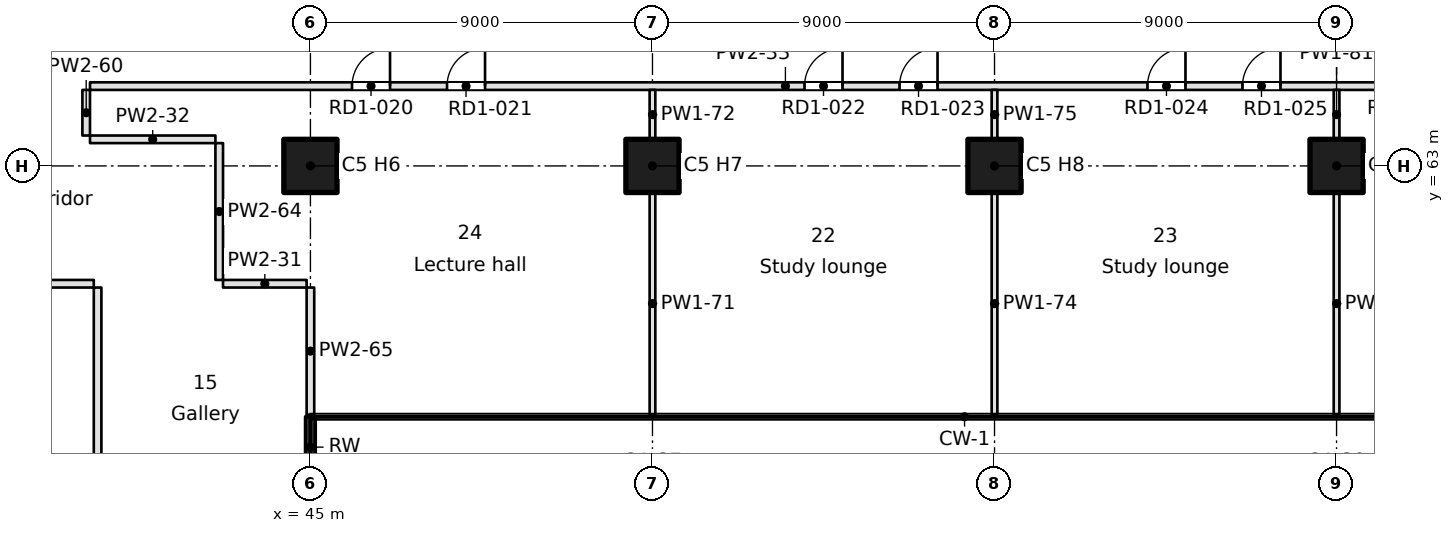
"""IFC4 building model, lengths in metres.
Left out: names, types, materials, properties, quantities, classifications, styles, units other than length and angle.
Written with IfcOpenShell. Run it as: python <this file> out.ifc"""

import sys

from ifc_helpers import new_model, si_unit, direction, frame, frame_2d, origin, origin_2d, place, context, subcontext, project, spatial, rectangle, extrude, element, fill, save


model = new_model("IFC4")
c1 = context("Model", 3, precision=1e-05, world=origin(), true_north=direction((0.0, 1.0)))
c2 = subcontext(c1, "Body", "Model", "MODEL_VIEW")
j1 = project(units=[si_unit("LENGTHUNIT", "METRE"), si_unit("PLANEANGLEUNIT", "RADIAN")], contexts=[c1])
p1 = place(None, origin())
s1 = spatial("IfcSite", under=j1, at=p1, CompositionType="ELEMENT")
p2 = place(p1, origin())
s2 = spatial("IfcBuilding", under=s1, at=p2, CompositionType="ELEMENT")
p3 = place(p2, frame((0.0, 0.0, 76.5)))
s3 = spatial("IfcBuildingStorey", under=s2, at=p3, CompositionType="ELEMENT", Elevation=76.5)
for number, where, z_axis, x_axis in (
    (1, (45.0, 63.0, 0.0), (0.0, 0.0, 1.0), (1.0, 0.0, 0.0)),
    (2, (54.0, 63.0, 0.0), (0.0, 0.0, 1.0), (1.0, 0.0, 0.0)),
    (3, (63.0, 63.0, 0.0), (0.0, 0.0, 1.0), (1.0, 0.0, 0.0)),
    (4, (72.0, 63.0, 0.0), (0.0, 0.0, 1.0), (1.0, 0.0, 0.0)),
):
    element("IfcColumn", number, at=place(p3, frame(where, z_axis=z_axis, x_axis=x_axis)), inside=s3, PredefinedType="COLUMN", context=c2, shape_type="SweptSolid", body=[
        extrude(rectangle(XDim=1.4, YDim=1.4, at=origin_2d()), origin(), (0.0, 0.0, 1.0), 3.7),
    ])
p4 = place(p3, frame((44.999, 54.8, 0.0), z_axis=(0.0, 0.0, 1.0), x_axis=(0.000152508767, 0.999999988371, 0.0)))
e5 = element("IfcWall", 5, at=p4, inside=s3, PredefinedType="SOLIDWALL", context=c2, shape_type="SweptSolid", body=[
    extrude(rectangle(XDim=1.601, YDim=0.25, at=frame_2d((0.8, 0.0))), origin(), (0.0, 0.0, 1.0), 3.25),
])
p5 = place(p3, frame((39.3, 59.9, 0.0), z_axis=(0.0, 0.0, 1.0), x_axis=(-1.0, 0.0, 0.0)))
e6 = element("IfcWall", 6, at=p5, inside=s3, PredefinedType="PARTITIONING", context=c2, shape_type="SweptSolid", body=[
    extrude(rectangle(XDim=11.8, YDim=0.2, at=frame_2d((5.9, 0.0))), origin(), (0.0, 0.0, 1.0), 3.25),
])
p6 = place(p3, frame((42.7, 59.9, 0.0), z_axis=(0.0, 0.0, 1.0), x_axis=(1.0, 0.0, 0.0)))
e7 = element("IfcWall", 7, at=p6, inside=s3, PredefinedType="PARTITIONING", context=c2, shape_type="SweptSolid", body=[
    extrude(rectangle(XDim=2.2, YDim=0.2, at=frame_2d((1.1, 0.0))), origin(), (0.0, 0.0, 1.0), 3.25),
])
p7 = place(p3, frame((39.2, 63.7, 0.0), z_axis=(0.0, 0.0, 1.0), x_axis=(1.0, 0.0, 0.0)))
e8 = element("IfcWall", 8, at=p7, inside=s3, PredefinedType="PARTITIONING", context=c2, shape_type="SweptSolid", body=[
    extrude(rectangle(XDim=3.3, YDim=0.2, at=frame_2d((1.65, 0.0))), origin(), (0.0, 0.0, 1.0), 3.25),
])
p8 = place(p3, frame((75.796, 65.1, 0.0), z_axis=(0.0, 0.0, 1.0), x_axis=(-1.0, 0.0, 0.0)))
e9 = element("IfcWall", 9, at=p8, inside=s3, PredefinedType="PARTITIONING", context=c2, shape_type="SweptSolid", body=[
    extrude(rectangle(XDim=36.596, YDim=0.2, at=frame_2d((18.298, 0.0))), origin(), (0.0, 0.0, 1.0), 3.25),
])
p9 = place(p8, frame((28.702, 0.0, 0.0)))
e10 = element("IfcOpeningElement", 10, at=p9, cuts=e9, PredefinedType="OPENING", context=c2, shape_type="SweptSolid", body=[
    extrude(rectangle(XDim=1.0, YDim=2.1, at=frame_2d((0.5, 1.05))), frame((0.0, 0.1, 0.0), z_axis=(0.0, -1.0, 0.0), x_axis=(1.0, 0.0, 0.0)), (0.0, 0.0, 1.0), 0.2),
])
p10 = place(p8, frame((26.202, 0.0, 0.0)))
e11 = element("IfcOpeningElement", 11, at=p10, cuts=e9, PredefinedType="OPENING", context=c2, shape_type="SweptSolid", body=[
    extrude(rectangle(XDim=1.0, YDim=2.1, at=frame_2d((0.5, 1.05))), frame((0.0, 0.1, 0.0), z_axis=(0.0, -1.0, 0.0), x_axis=(1.0, 0.0, 0.0)), (0.0, 0.0, 1.0), 0.2),
])
p11 = place(p8, frame((16.795, 0.0, 0.0)))
e12 = element("IfcOpeningElement", 12, at=p11, cuts=e9, PredefinedType="OPENING", context=c2, shape_type="SweptSolid", body=[
    extrude(rectangle(XDim=1.0, YDim=2.1, at=frame_2d((0.5, 1.05))), frame((0.0, 0.1, 0.0), z_axis=(0.0, -1.0, 0.0), x_axis=(1.0, 0.0, 0.0)), (0.0, 0.0, 1.0), 0.2),
])
p12 = place(p8, frame((14.295, 0.0, 0.0)))
e13 = element("IfcOpeningElement", 13, at=p12, cuts=e9, PredefinedType="OPENING", context=c2, shape_type="SweptSolid", body=[
    extrude(rectangle(XDim=1.0, YDim=2.1, at=frame_2d((0.5, 1.05))), frame((0.0, 0.1, 0.0), z_axis=(0.0, -1.0, 0.0), x_axis=(1.0, 0.0, 0.0)), (0.0, 0.0, 1.0), 0.2),
])
p13 = place(p8, frame((7.772, 0.0, 0.0)))
e14 = element("IfcOpeningElement", 14, at=p13, cuts=e9, PredefinedType="OPENING", context=c2, shape_type="SweptSolid", body=[
    extrude(rectangle(XDim=1.0, YDim=2.1, at=frame_2d((0.5, 1.05))), frame((0.0, 0.1, 0.0), z_axis=(0.0, -1.0, 0.0), x_axis=(1.0, 0.0, 0.0)), (0.0, 0.0, 1.0), 0.2),
])
p14 = place(p8, frame((5.272, 0.0, 0.0)))
e15 = element("IfcOpeningElement", 15, at=p14, cuts=e9, PredefinedType="OPENING", context=c2, shape_type="SweptSolid", body=[
    extrude(rectangle(XDim=1.0, YDim=2.1, at=frame_2d((0.5, 1.05))), frame((0.0, 0.1, 0.0), z_axis=(0.0, -1.0, 0.0), x_axis=(1.0, 0.0, 0.0)), (0.0, 0.0, 1.0), 0.2),
])
p15 = place(p8, frame((1.38, 0.0, 0.0)))
e16 = element("IfcOpeningElement", 16, at=p15, cuts=e9, PredefinedType="OPENING", context=c2, shape_type="SweptSolid", body=[
    extrude(rectangle(XDim=1.0, YDim=2.1, at=frame_2d((0.5, 1.05))), frame((0.0, 0.1, 0.0), z_axis=(0.0, -1.0, 0.0), x_axis=(1.0, 0.0, 0.0)), (0.0, 0.0, 1.0), 0.2),
])
p16 = place(p3, frame((39.1, 65.0, 0.0), z_axis=(0.0, 0.0, 1.0), x_axis=(0.0, -1.0, 0.0)))
e17 = element("IfcWall", 17, at=p16, inside=s3, PredefinedType="PARTITIONING", context=c2, shape_type="SweptSolid", body=[
    extrude(rectangle(XDim=1.2, YDim=0.2, at=frame_2d((0.6, 0.0))), origin(), (0.0, 0.0, 1.0), 3.25),
])
p17 = place(p3, frame((39.4, 16.991, 0.0), z_axis=(0.0, 0.0, 1.0), x_axis=(0.0, 1.0, 0.0)))
e18 = element("IfcWall", 18, at=p17, inside=s3, PredefinedType="PARTITIONING", context=c2, shape_type="SweptSolid", body=[
    extrude(rectangle(XDim=42.809, YDim=0.2, at=frame_2d((21.405, 0.0))), origin(), (0.0, 0.0, 1.0), 3.25),
])
p18 = place(p17, frame((4.608, 0.0, 0.0)))
e19 = element("IfcOpeningElement", 19, at=p18, cuts=e18, PredefinedType="OPENING", context=c2, shape_type="SweptSolid", body=[
    extrude(rectangle(XDim=1.8, YDim=2.1, at=frame_2d((0.9, 1.05))), frame((0.0, 0.1, 0.0), z_axis=(0.0, -1.0, 0.0), x_axis=(1.0, 0.0, 0.0)), (0.0, 0.0, 1.0), 0.2),
])
p19 = place(p17, frame((13.62, 0.0, 0.0)))
e20 = element("IfcOpeningElement", 20, at=p19, cuts=e18, PredefinedType="OPENING", context=c2, shape_type="SweptSolid", body=[
    extrude(rectangle(XDim=1.8, YDim=2.1, at=frame_2d((0.9, 1.05))), frame((0.0, 0.1, 0.0), z_axis=(0.0, -1.0, 0.0), x_axis=(1.0, 0.0, 0.0)), (0.0, 0.0, 1.0), 0.2),
])
p20 = place(p17, frame((22.633, 0.0, 0.0)))
e21 = element("IfcOpeningElement", 21, at=p20, cuts=e18, PredefinedType="OPENING", context=c2, shape_type="SweptSolid", body=[
    extrude(rectangle(XDim=1.8, YDim=2.1, at=frame_2d((0.9, 1.05))), frame((0.0, 0.1, 0.0), z_axis=(0.0, -1.0, 0.0), x_axis=(1.0, 0.0, 0.0)), (0.0, 0.0, 1.0), 0.2),
])
p21 = place(p17, frame((34.524, 0.0, 0.0)))
e22 = element("IfcOpeningElement", 22, at=p21, cuts=e18, PredefinedType="OPENING", context=c2, shape_type="SweptSolid", body=[
    extrude(rectangle(XDim=1.8, YDim=2.1, at=frame_2d((0.9, 1.05))), frame((0.0, 0.1, 0.0), z_axis=(0.0, -1.0, 0.0), x_axis=(1.0, 0.0, 0.0)), (0.0, 0.0, 1.0), 0.2),
])
p22 = place(p3, frame((42.6, 63.6, 0.0), z_axis=(0.0, 0.0, 1.0), x_axis=(0.0, -1.0, 0.0)))
e23 = element("IfcWall", 23, at=p22, inside=s3, PredefinedType="PARTITIONING", context=c2, shape_type="SweptSolid", body=[
    extrude(rectangle(XDim=3.6, YDim=0.2, at=frame_2d((1.8, 0.0))), origin(), (0.0, 0.0, 1.0), 3.25),
])
p23 = place(p3, frame((45.0, 59.8, 0.0), z_axis=(0.0, 0.0, 1.0), x_axis=(0.0, -1.0, 0.0)))
e24 = element("IfcWall", 24, at=p23, inside=s3, PredefinedType="PARTITIONING", context=c2, shape_type="SweptSolid", body=[
    extrude(rectangle(XDim=3.345, YDim=0.2, at=frame_2d((1.673, 0.0))), origin(), (0.0, 0.0, 1.0), 3.25),
])
p24 = place(p3, frame((54.0, 62.3, 0.0), z_axis=(0.0, 0.0, 1.0), x_axis=(0.0, -1.0, 0.0)))
e25 = element("IfcWall", 25, at=p24, inside=s3, PredefinedType="PARTITIONING", context=c2, shape_type="SweptSolid", body=[
    extrude(rectangle(XDim=5.845, YDim=0.15, at=frame_2d((2.923, 0.0))), origin(), (0.0, 0.0, 1.0), 3.25),
])
p25 = place(p3, frame((54.0, 65.0, 0.0), z_axis=(0.0, 0.0, 1.0), x_axis=(0.0, -1.0, 0.0)))
e26 = element("IfcWall", 26, at=p25, inside=s3, PredefinedType="PARTITIONING", context=c2, shape_type="SweptSolid", body=[
    extrude(rectangle(XDim=1.3, YDim=0.15, at=frame_2d((0.65, 0.0))), origin(), (0.0, 0.0, 1.0), 3.25),
])
p26 = place(p3, frame((63.0, 62.3, 0.0), z_axis=(0.0, 0.0, 1.0), x_axis=(0.0, -1.0, 0.0)))
e27 = element("IfcWall", 27, at=p26, inside=s3, PredefinedType="PARTITIONING", context=c2, shape_type="SweptSolid", body=[
    extrude(rectangle(XDim=5.845, YDim=0.15, at=frame_2d((2.923, 0.0))), origin(), (0.0, 0.0, 1.0), 3.25),
])
p27 = place(p3, frame((63.0, 65.0, 0.0), z_axis=(0.0, 0.0, 1.0), x_axis=(0.0, -1.0, 0.0)))
e28 = element("IfcWall", 28, at=p27, inside=s3, PredefinedType="PARTITIONING", context=c2, shape_type="SweptSolid", body=[
    extrude(rectangle(XDim=1.3, YDim=0.15, at=frame_2d((0.65, 0.0))), origin(), (0.0, 0.0, 1.0), 3.25),
])
p28 = place(p3, frame((72.0, 62.3, 0.0), z_axis=(0.0, 0.0, 1.0), x_axis=(0.0, -1.0, 0.0)))
e29 = element("IfcWall", 29, at=p28, inside=s3, PredefinedType="PARTITIONING", context=c2, shape_type="SweptSolid", body=[
    extrude(rectangle(XDim=5.845, YDim=0.15, at=frame_2d((2.923, 0.0))), origin(), (0.0, 0.0, 1.0), 3.25),
])
p29 = place(p3, frame((72.0, 65.0, 0.0), z_axis=(0.0, 0.0, 1.0), x_axis=(0.0, -1.0, 0.0)))
e30 = element("IfcWall", 30, at=p29, inside=s3, PredefinedType="PARTITIONING", context=c2, shape_type="SweptSolid", body=[
    extrude(rectangle(XDim=1.3, YDim=0.15, at=frame_2d((0.65, 0.0))), origin(), (0.0, 0.0, 1.0), 3.25),
])
p30 = place(p9, frame((1.0, 0.0, 0.0), z_axis=(0.0, 0.0, 1.0), x_axis=(-1.0, 0.0, 0.0)))
e31 = element("IfcDoor", 31, at=p30, inside=s3, OperationType="SINGLE_SWING_RIGHT", PredefinedType="DOOR", context=c2, shape_type="SweptSolid", body=[
    extrude(rectangle(XDim=1.0, YDim=2.1, at=frame_2d((0.5, 1.05))), frame((0.0, 0.025, 0.0), z_axis=(0.0, -1.0, 0.0), x_axis=(1.0, 0.0, 0.0)), (0.0, 0.0, 1.0), 0.05),
])
fill(e10, e31)
p31 = place(p10, frame((1.0, 0.0, 0.0), z_axis=(0.0, 0.0, 1.0), x_axis=(-1.0, 0.0, 0.0)))
e32 = element("IfcDoor", 32, at=p31, inside=s3, OperationType="SINGLE_SWING_RIGHT", PredefinedType="DOOR", context=c2, shape_type="SweptSolid", body=[
    extrude(rectangle(XDim=1.0, YDim=2.1, at=frame_2d((0.5, 1.05))), frame((0.0, 0.025, 0.0), z_axis=(0.0, -1.0, 0.0), x_axis=(1.0, 0.0, 0.0)), (0.0, 0.0, 1.0), 0.05),
])
fill(e11, e32)
p32 = place(p11, frame((1.0, 0.0, 0.0), z_axis=(0.0, 0.0, 1.0), x_axis=(-1.0, 0.0, 0.0)))
e33 = element("IfcDoor", 33, at=p32, inside=s3, OperationType="SINGLE_SWING_RIGHT", PredefinedType="DOOR", context=c2, shape_type="SweptSolid", body=[
    extrude(rectangle(XDim=1.0, YDim=2.1, at=frame_2d((0.5, 1.05))), frame((0.0, 0.025, 0.0), z_axis=(0.0, -1.0, 0.0), x_axis=(1.0, 0.0, 0.0)), (0.0, 0.0, 1.0), 0.05),
])
fill(e12, e33)
p33 = place(p12, frame((1.0, 0.0, 0.0), z_axis=(0.0, 0.0, 1.0), x_axis=(-1.0, 0.0, 0.0)))
e34 = element("IfcDoor", 34, at=p33, inside=s3, OperationType="SINGLE_SWING_RIGHT", PredefinedType="DOOR", context=c2, shape_type="SweptSolid", body=[
    extrude(rectangle(XDim=1.0, YDim=2.1, at=frame_2d((0.5, 1.05))), frame((0.0, 0.025, 0.0), z_axis=(0.0, -1.0, 0.0), x_axis=(1.0, 0.0, 0.0)), (0.0, 0.0, 1.0), 0.05),
])
fill(e13, e34)
p34 = place(p13, frame((1.0, 0.0, 0.0), z_axis=(0.0, 0.0, 1.0), x_axis=(-1.0, 0.0, 0.0)))
e35 = element("IfcDoor", 35, at=p34, inside=s3, OperationType="SINGLE_SWING_RIGHT", PredefinedType="DOOR", context=c2, shape_type="SweptSolid", body=[
    extrude(rectangle(XDim=1.0, YDim=2.1, at=frame_2d((0.5, 1.05))), frame((0.0, 0.025, 0.0), z_axis=(0.0, -1.0, 0.0), x_axis=(1.0, 0.0, 0.0)), (0.0, 0.0, 1.0), 0.05),
])
fill(e14, e35)
p35 = place(p14, frame((1.0, 0.0, 0.0), z_axis=(0.0, 0.0, 1.0), x_axis=(-1.0, 0.0, 0.0)))
e36 = element("IfcDoor", 36, at=p35, inside=s3, OperationType="SINGLE_SWING_RIGHT", PredefinedType="DOOR", context=c2, shape_type="SweptSolid", body=[
    extrude(rectangle(XDim=1.0, YDim=2.1, at=frame_2d((0.5, 1.05))), frame((0.0, 0.025, 0.0), z_axis=(0.0, -1.0, 0.0), x_axis=(1.0, 0.0, 0.0)), (0.0, 0.0, 1.0), 0.05),
])
fill(e15, e36)
save(model, sys.argv[1])
